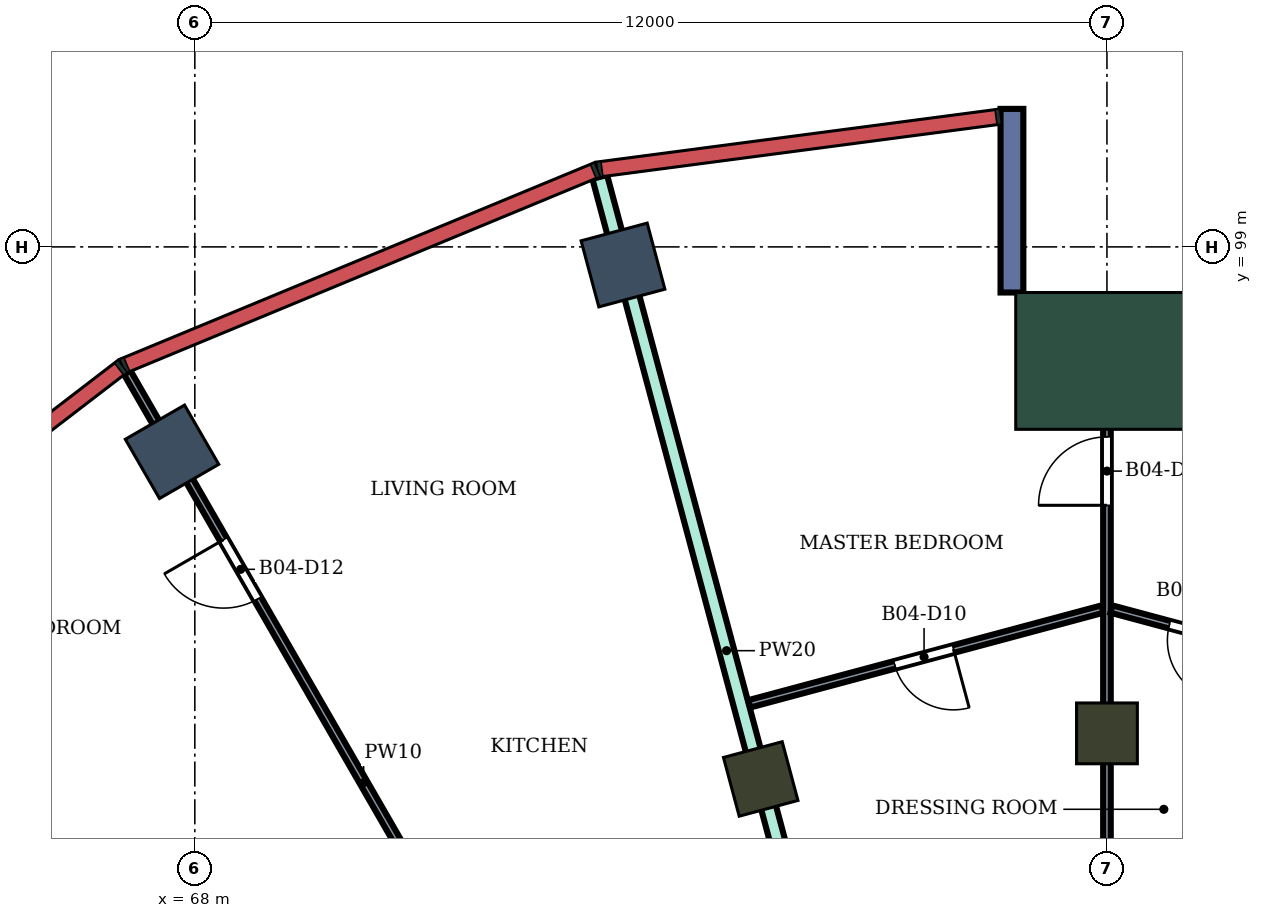
"""IFC4 building model, lengths in metres.
Left out: names, types, materials, properties, quantities, classifications, styles, units other than length and angle.
Written with IfcOpenShell. Run it as: python <this file> out.ifc"""

import sys

from ifc_helpers import new_model, si_unit, direction, frame, frame_2d, origin, origin_2d, place, context, subcontext, project, spatial, rectangle, extrude, element, fill, save


model = new_model("IFC4")
c1 = context("Model", 3, precision=1e-05, world=origin(), true_north=direction((0.0, 1.0)))
c2 = subcontext(c1, "Body", "Model", "MODEL_VIEW")
j1 = project(units=[si_unit("LENGTHUNIT", "METRE"), si_unit("PLANEANGLEUNIT", "RADIAN")], contexts=[c1])
p1 = place(None, origin())
s1 = spatial("IfcSite", under=j1, at=p1, CompositionType="ELEMENT")
p2 = place(p1, origin())
s2 = spatial("IfcBuilding", under=s1, at=p2, CompositionType="ELEMENT")
p3 = place(p2, frame((0.0, 0.0, 258.3)))
s3 = spatial("IfcBuildingStorey", under=s2, at=p3, CompositionType="ELEMENT", Elevation=258.3)
for number, where, z_axis, x_axis in (
    (1, (73.633, 98.762, 0.0), (0.0, 0.0, 1.0), (-0.259, 0.966, 0.0)),
    (2, (67.7, 96.304, 0.0), (0.0, 0.0, 1.0), (-0.5, 0.866, 0.0)),
):
    element("IfcColumn", number, at=place(p3, frame(where, z_axis=z_axis, x_axis=x_axis)), inside=s3, PredefinedType="COLUMN", context=c2, shape_type="SweptSolid", body=[
        extrude(rectangle(XDim=0.9, YDim=0.9, at=origin_2d()), origin(), (0.0, 0.0, 1.0), 4.2),
    ])
for number, where, z_axis, x_axis in (
    (3, (80.0, 92.6, 0.0), (0.0, 0.0, 1.0), (0.0, 1.0, 0.0)),
    (4, (75.445, 92.0, 0.0), (0.0, 0.0, 1.0), (-0.259, 0.966, 0.0)),
):
    element("IfcColumn", number, at=place(p3, frame(where, z_axis=z_axis, x_axis=x_axis)), inside=s3, PredefinedType="COLUMN", context=c2, shape_type="SweptSolid", body=[
        extrude(rectangle(XDim=0.8, YDim=0.8, at=origin_2d()), origin(), (0.0, 0.0, 1.0), 4.2),
    ])
p4 = place(p3, frame((80.0, 97.5, 0.0), z_axis=(0.0, 0.0, 1.0), x_axis=(0.0, 1.0, 0.0)))
e5 = element("IfcColumn", 5, at=p4, inside=s3, PredefinedType="COLUMN", context=c2, shape_type="SweptSolid", body=[
    extrude(rectangle(XDim=1.8, YDim=2.4, at=origin_2d()), origin(), (0.0, 0.0, 1.0), 4.2),
])
p5 = place(p3, frame((78.75, 98.4, 0.0), z_axis=(0.0, 0.0, 1.0), x_axis=(0.0, 1.0, 0.0)))
e6 = element("IfcWall", 6, at=p5, inside=s3, PredefinedType="NOTDEFINED", context=c2, shape_type="SweptSolid", body=[
    extrude(rectangle(XDim=2.416, YDim=0.3, at=frame_2d((1.208, 0.0))), origin(), (0.0, 0.0, 1.0), 4.2),
])
p6 = place(p3, frame((73.327, 99.92, 0.0), z_axis=(0.0, 0.0, 1.0), x_axis=(0.258652861824, -0.965970339643, 0.0)))
e7 = element("IfcWall", 7, at=p6, inside=s3, PredefinedType="PARTITIONING", context=c2, shape_type="SweptSolid", body=[
    extrude(rectangle(XDim=12.904, YDim=0.2, at=frame_2d((6.452, 0.0))), origin(), (0.0, 0.0, 1.0), 3.75),
])
p7 = place(p3, frame((63.597, 91.407, 0.0), z_axis=(0.0, 0.0, 1.0), x_axis=(0.70700623685, -0.707207311228, 0.0)))
e8 = element("IfcWall", 8, at=p7, inside=s3, PredefinedType="PARTITIONING", context=c2, shape_type="SweptSolid", body=[
    extrude(rectangle(XDim=8.499, YDim=0.1, at=frame_2d((4.25, 0.0))), origin(), (0.0, 0.0, 1.0), 3.75),
])
p8 = place(p7, frame((1.632, 0.0, 0.0)))
e9 = element("IfcOpeningElement", 9, at=p8, cuts=e8, PredefinedType="OPENING", context=c2, shape_type="SweptSolid", body=[
    extrude(rectangle(XDim=0.9, YDim=2.1, at=frame_2d((0.45, 1.05))), frame((0.0, 0.06, 0.0), z_axis=(0.0, -1.0, 0.0), x_axis=(1.0, 0.0, 0.0)), (0.0, 0.0, 1.0), 0.12),
])
p9 = place(p3, frame((67.111, 97.347, 0.0), z_axis=(0.0, 0.0, 1.0), x_axis=(0.499428303955, -0.866355221147, 0.0)))
e10 = element("IfcWall", 10, at=p9, inside=s3, PredefinedType="PARTITIONING", context=c2, shape_type="SweptSolid", body=[
    extrude(rectangle(XDim=12.456, YDim=0.1, at=frame_2d((6.228, 0.0))), origin(), (0.0, 0.0, 1.0), 3.75),
])
p10 = place(p9, frame((2.538, 0.0, 0.0)))
e11 = element("IfcOpeningElement", 11, at=p10, cuts=e10, PredefinedType="OPENING", context=c2, shape_type="SweptSolid", body=[
    extrude(rectangle(XDim=0.9, YDim=2.1, at=frame_2d((0.45, 1.05))), frame((0.0, 0.06, 0.0), z_axis=(0.0, -1.0, 0.0), x_axis=(1.0, 0.0, 0.0)), (0.0, 0.0, 1.0), 0.12),
])
p11 = place(p9, frame((10.055, 0.0, 0.0)))
e12 = element("IfcOpeningElement", 12, at=p11, cuts=e10, PredefinedType="OPENING", context=c2, shape_type="SweptSolid", body=[
    extrude(rectangle(XDim=0.8, YDim=2.1, at=frame_2d((0.4, 1.05))), frame((0.0, 0.06, 0.0), z_axis=(0.0, -1.0, 0.0), x_axis=(1.0, 0.0, 0.0)), (0.0, 0.0, 1.0), 0.12),
])
p12 = place(p3, frame((75.294, 92.989, 0.0), z_axis=(0.0, 0.0, 1.0), x_axis=(0.965836333205, 0.259152807165, 0.0)))
e13 = element("IfcWall", 13, at=p12, inside=s3, PredefinedType="PARTITIONING", context=c2, shape_type="SweptSolid", body=[
    extrude(rectangle(XDim=4.812, YDim=0.1, at=frame_2d((2.406, 0.0))), origin(), (0.0, 0.0, 1.0), 3.75),
])
p13 = place(p12, frame((1.981, 0.0, 0.0)))
e14 = element("IfcOpeningElement", 14, at=p13, cuts=e13, PredefinedType="OPENING", context=c2, shape_type="SweptSolid", body=[
    extrude(rectangle(XDim=0.8, YDim=2.1, at=frame_2d((0.4, 1.05))), frame((0.0, 0.06, 0.0), z_axis=(0.0, -1.0, 0.0), x_axis=(1.0, 0.0, 0.0)), (0.0, 0.0, 1.0), 0.12),
])
p14 = place(p3, frame((80.0, 88.246, 0.0), z_axis=(0.0, 0.0, 1.0), x_axis=(0.0, 1.0, 0.0)))
e15 = element("IfcWall", 15, at=p14, inside=s3, PredefinedType="PARTITIONING", context=c2, shape_type="SweptSolid", body=[
    extrude(rectangle(XDim=9.954, YDim=0.1, at=frame_2d((4.977, 0.0))), origin(), (0.0, 0.0, 1.0), 3.75),
])
p15 = place(p14, frame((7.354, 0.0, 0.0)))
e16 = element("IfcOpeningElement", 16, at=p15, cuts=e15, PredefinedType="OPENING", context=c2, shape_type="SweptSolid", body=[
    extrude(rectangle(XDim=0.9, YDim=2.1, at=frame_2d((0.45, 1.05))), frame((0.0, 0.06, 0.0), z_axis=(0.0, -1.0, 0.0), x_axis=(1.0, 0.0, 0.0)), (0.0, 0.0, 1.0), 0.12),
])
p16 = place(p3, frame((80.058, 94.235, 0.0), z_axis=(0.0, 0.0, 1.0), x_axis=(0.965831212389, -0.259171891173, 0.0)))
e17 = element("IfcWall", 17, at=p16, inside=s3, PredefinedType="PARTITIONING", context=c2, shape_type="SweptSolid", body=[
    extrude(rectangle(XDim=4.872, YDim=0.1, at=frame_2d((2.436, 0.0))), origin(), (0.0, 0.0, 1.0), 3.75),
])
p17 = place(p16, frame((0.792, 0.0, 0.0)))
e18 = element("IfcOpeningElement", 18, at=p17, cuts=e17, PredefinedType="OPENING", context=c2, shape_type="SweptSolid", body=[
    extrude(rectangle(XDim=0.8, YDim=2.1, at=frame_2d((0.4, 1.05))), frame((0.0, 0.06, 0.0), z_axis=(0.0, -1.0, 0.0), x_axis=(1.0, 0.0, 0.0)), (0.0, 0.0, 1.0), 0.12),
])
p18 = place(p3, frame((80.635, 88.179, 0.0), z_axis=(0.0, 0.0, 1.0), x_axis=(0.258942728312, 0.965892676986, 0.0)))
e19 = element("IfcWall", 19, at=p18, inside=s3, PredefinedType="PARTITIONING", context=c2, shape_type="SweptSolid", body=[
    extrude(rectangle(XDim=5.649, YDim=0.1, at=frame_2d((2.825, 0.0))), origin(), (0.0, 0.0, 1.0), 3.75),
])
p19 = place(p17, frame((0.8, 0.0, 0.0), z_axis=(0.0, 0.0, 1.0), x_axis=(-1.0, 0.0, 0.0)))
e20 = element("IfcDoor", 20, at=p19, inside=s3, OperationType="SINGLE_SWING_LEFT", PredefinedType="DOOR", context=c2, shape_type="SweptSolid", body=[
    extrude(rectangle(XDim=0.8, YDim=2.1, at=frame_2d((0.4, 1.05))), frame((0.0, 0.025, 0.0), z_axis=(0.0, -1.0, 0.0), x_axis=(1.0, 0.0, 0.0)), (0.0, 0.0, 1.0), 0.05),
])
fill(e18, e20)
p20 = place(p15, origin())
e21 = element("IfcDoor", 21, at=p20, inside=s3, OperationType="SINGLE_SWING_LEFT", PredefinedType="DOOR", context=c2, shape_type="SweptSolid", body=[
    extrude(rectangle(XDim=0.9, YDim=2.1, at=frame_2d((0.45, 1.05))), frame((0.0, 0.025, 0.0), z_axis=(0.0, -1.0, 0.0), x_axis=(1.0, 0.0, 0.0)), (0.0, 0.0, 1.0), 0.05),
])
fill(e16, e21)
p21 = place(p13, frame((0.8, 0.0, 0.0), z_axis=(0.0, 0.0, 1.0), x_axis=(-1.0, 0.0, 0.0)))
e22 = element("IfcDoor", 22, at=p21, inside=s3, OperationType="SINGLE_SWING_LEFT", PredefinedType="DOOR", context=c2, shape_type="SweptSolid", body=[
    extrude(rectangle(XDim=0.8, YDim=2.1, at=frame_2d((0.4, 1.05))), frame((0.0, 0.025, 0.0), z_axis=(0.0, -1.0, 0.0), x_axis=(1.0, 0.0, 0.0)), (0.0, 0.0, 1.0), 0.05),
])
fill(e14, e22)
p22 = place(p10, frame((0.9, 0.0, 0.0), z_axis=(0.0, 0.0, 1.0), x_axis=(-1.0, 0.0, 0.0)))
e23 = element("IfcDoor", 23, at=p22, inside=s3, OperationType="SINGLE_SWING_RIGHT", PredefinedType="DOOR", context=c2, shape_type="SweptSolid", body=[
    extrude(rectangle(XDim=0.9, YDim=2.1, at=frame_2d((0.45, 1.05))), frame((0.0, 0.025, 0.0), z_axis=(0.0, -1.0, 0.0), x_axis=(1.0, 0.0, 0.0)), (0.0, 0.0, 1.0), 0.05),
])
fill(e11, e23)
save(model, sys.argv[1])
